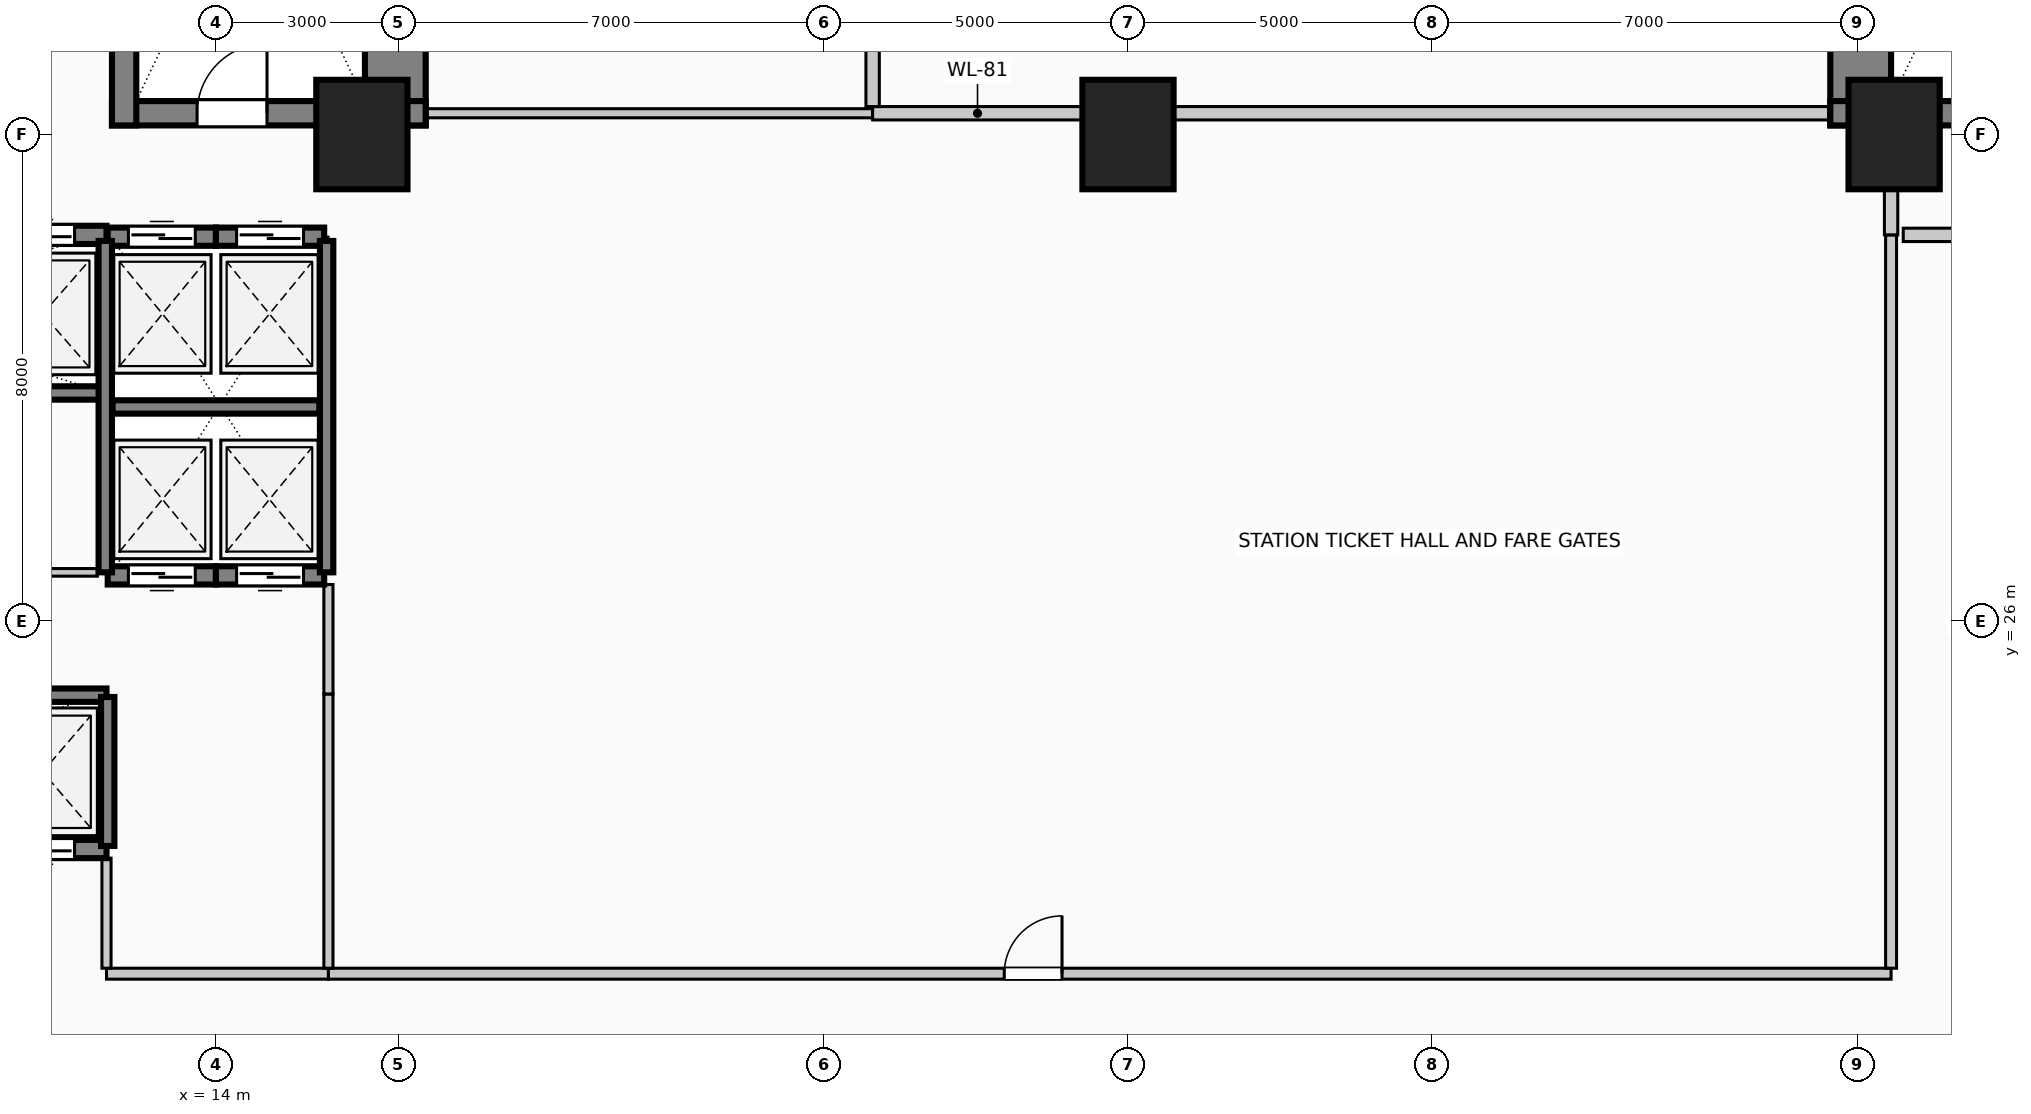
"""IFC4 building model, lengths in metres.
Left out: names, types, materials, properties, quantities, classifications, styles, units other than length and angle.
Written with IfcOpenShell. Run it as: python <this file> out.ifc"""

import sys

from ifc_helpers import new_model, si_unit, direction, frame, frame_2d, origin, origin_2d, place, context, subcontext, project, spatial, rectangle, extrude, element, fill, save


model = new_model("IFC4")
c1 = context("Model", 3, precision=1e-05, world=origin(), true_north=direction((0.0, 1.0)))
c2 = subcontext(c1, "Body", "Model", "MODEL_VIEW")
j1 = project(units=[si_unit("LENGTHUNIT", "METRE"), si_unit("PLANEANGLEUNIT", "RADIAN")], contexts=[c1])
p1 = place(None, origin())
s1 = spatial("IfcSite", under=j1, at=p1, CompositionType="ELEMENT")
p2 = place(p1, origin())
s2 = spatial("IfcBuilding", under=s1, at=p2, CompositionType="ELEMENT")
p3 = place(p2, origin())
s3 = spatial("IfcBuildingStorey", under=s2, at=p3, CompositionType="ELEMENT", Elevation=0.0)
p4 = place(p3, frame((16.95, 34.15, 0.0), z_axis=(0.0, 0.0, 1.0), x_axis=(0.0, 1.0, 0.0)))
e1 = element("IfcWall", 1, at=p4, inside=s3, PredefinedType="SHEAR", context=c2, shape_type="SweptSolid", body=[
    extrude(rectangle(XDim=9.28, YDim=1.0, at=frame_2d((4.64, 0.0))), origin(), (0.0, 0.0, 1.0), 5.4),
])
p5 = place(p3, frame((12.29, 34.35, 0.0), z_axis=(0.0, 0.0, 1.0), x_axis=(1.0, 0.0, 0.0)))
e2 = element("IfcWall", 2, at=p5, inside=s3, PredefinedType="SHEAR", context=c2, shape_type="SweptSolid", body=[
    extrude(rectangle(XDim=5.16, YDim=0.4, at=frame_2d((2.58, 0.0))), origin(), (0.0, 0.0, 1.0), 5.4),
])
p6 = place(p5, frame((1.4, 0.0, 0.0)))
e3 = element("IfcOpeningElement", 3, at=p6, cuts=e2, PredefinedType="OPENING", context=c2, shape_type="SweptSolid", body=[
    extrude(rectangle(XDim=1.15, YDim=2.2, at=frame_2d((0.575, 1.1))), frame((0.0, 0.21, 0.0), z_axis=(0.0, -1.0, 0.0), x_axis=(1.0, 0.0, 0.0)), (0.0, 0.0, 1.0), 0.42),
])
p7 = place(p3, frame((12.49, 34.15, 0.0), z_axis=(0.0, 0.0, 1.0), x_axis=(0.0, 1.0, 0.0)))
e4 = element("IfcWall", 4, at=p7, inside=s3, PredefinedType="SHEAR", context=c2, shape_type="SweptSolid", body=[
    extrude(rectangle(XDim=9.28, YDim=0.4, at=frame_2d((4.64, 0.0))), origin(), (0.0, 0.0, 1.0), 5.4),
])
p8 = place(p3, frame((41.05, 34.15, 0.0), z_axis=(0.0, 0.0, 1.0), x_axis=(0.0, 1.0, 0.0)))
e5 = element("IfcWall", 5, at=p8, inside=s3, PredefinedType="SHEAR", context=c2, shape_type="SweptSolid", body=[
    extrude(rectangle(XDim=9.28, YDim=1.0, at=frame_2d((4.64, 0.0))), origin(), (0.0, 0.0, 1.0), 5.4),
])
p9 = place(p3, frame((40.55, 34.35, 0.0), z_axis=(0.0, 0.0, 1.0), x_axis=(1.0, 0.0, 0.0)))
e6 = element("IfcWall", 6, at=p9, inside=s3, PredefinedType="SHEAR", context=c2, shape_type="SweptSolid", body=[
    extrude(rectangle(XDim=5.16, YDim=0.4, at=frame_2d((2.58, 0.0))), origin(), (0.0, 0.0, 1.0), 5.4),
])
p10 = place(p9, frame((2.4, 0.0, 0.0)))
e7 = element("IfcOpeningElement", 7, at=p10, cuts=e6, PredefinedType="OPENING", context=c2, shape_type="SweptSolid", body=[
    extrude(rectangle(XDim=1.15, YDim=2.2, at=frame_2d((0.575, 1.1))), frame((0.0, 0.21, 0.0), z_axis=(0.0, -1.0, 0.0), x_axis=(1.0, 0.0, 0.0)), (0.0, 0.0, 1.0), 0.42),
])
for number, where, z_axis, x_axis in (
    (8, (16.4, 34.0, 0.0), (0.0, 0.0, 1.0), (1.0, 0.0, 0.0)),
    (9, (29.0, 34.0, 0.0), (0.0, 0.0, 1.0), (1.0, 0.0, 0.0)),
    (10, (41.6, 34.0, 0.0), (0.0, 0.0, 1.0), (1.0, 0.0, 0.0)),
):
    element("IfcColumn", number, at=place(p3, frame(where, z_axis=z_axis, x_axis=x_axis)), inside=s3, PredefinedType="COLUMN", context=c2, shape_type="SweptSolid", body=[
        extrude(rectangle(XDim=1.5, YDim=1.8, at=origin_2d()), origin(), (0.0, 0.0, 1.0), 5.4),
    ])
p11 = place(p3, frame((12.2, 22.25, 0.0), z_axis=(0.0, 0.0, 1.0), x_axis=(-1.0, 0.0, 0.0)))
e11 = element("IfcWall", 11, at=p11, inside=s3, PredefinedType="SOLIDWALL", context=c2, shape_type="SweptSolid", body=[
    extrude(rectangle(XDim=2.15, YDim=0.3, at=frame_2d((1.075, 0.0))), origin(), (0.0, 0.0, 1.0), 5.4),
])
p12 = place(p11, frame((0.525, 0.0, 0.0)))
e12 = element("IfcOpeningElement", 12, at=p12, cuts=e11, PredefinedType="OPENING", context=c2, shape_type="SweptSolid", body=[
    extrude(rectangle(XDim=1.1, YDim=2.2, at=frame_2d((0.55, 1.1))), frame((0.0, 0.16, 0.0), z_axis=(0.0, -1.0, 0.0), x_axis=(1.0, 0.0, 0.0)), (0.0, 0.0, 1.0), 0.32),
])
p13 = place(p3, frame((14.0, 26.75, 0.0), z_axis=(0.0, 0.0, 1.0), x_axis=(-1.0, 0.0, 0.0)))
e13 = element("IfcWall", 13, at=p13, inside=s3, PredefinedType="SOLIDWALL", context=c2, shape_type="SweptSolid", body=[
    extrude(rectangle(XDim=1.78, YDim=0.3, at=frame_2d((0.89, 0.0))), origin(), (0.0, 0.0, 1.0), 5.4),
])
p14 = place(p13, frame((0.34, 0.0, 0.0)))
e14 = element("IfcOpeningElement", 14, at=p14, cuts=e13, PredefinedType="OPENING", context=c2, shape_type="SweptSolid", body=[
    extrude(rectangle(XDim=1.1, YDim=2.2, at=frame_2d((0.55, 1.1))), frame((0.0, 0.16, 0.0), z_axis=(0.0, -1.0, 0.0), x_axis=(1.0, 0.0, 0.0)), (0.0, 0.0, 1.0), 0.32),
])
p15 = place(p3, frame((15.78, 26.75, 0.0), z_axis=(0.0, 0.0, 1.0), x_axis=(-1.0, 0.0, 0.0)))
e15 = element("IfcWall", 15, at=p15, inside=s3, PredefinedType="SOLIDWALL", context=c2, shape_type="SweptSolid", body=[
    extrude(rectangle(XDim=1.78, YDim=0.3, at=frame_2d((0.89, 0.0))), origin(), (0.0, 0.0, 1.0), 5.4),
])
p16 = place(p15, frame((0.34, 0.0, 0.0)))
e16 = element("IfcOpeningElement", 16, at=p16, cuts=e15, PredefinedType="OPENING", context=c2, shape_type="SweptSolid", body=[
    extrude(rectangle(XDim=1.1, YDim=2.2, at=frame_2d((0.55, 1.1))), frame((0.0, 0.16, 0.0), z_axis=(0.0, -1.0, 0.0), x_axis=(1.0, 0.0, 0.0)), (0.0, 0.0, 1.0), 0.32),
])
p17 = place(p3, frame((12.22, 32.32, 0.0), z_axis=(0.0, 0.0, 1.0), x_axis=(1.0, 0.0, 0.0)))
e17 = element("IfcWall", 17, at=p17, inside=s3, PredefinedType="SOLIDWALL", context=c2, shape_type="SweptSolid", body=[
    extrude(rectangle(XDim=1.78, YDim=0.3, at=frame_2d((0.89, 0.0))), origin(), (0.0, 0.0, 1.0), 5.4),
])
p18 = place(p17, frame((0.34, 0.0, 0.0)))
e18 = element("IfcOpeningElement", 18, at=p18, cuts=e17, PredefinedType="OPENING", context=c2, shape_type="SweptSolid", body=[
    extrude(rectangle(XDim=1.1, YDim=2.2, at=frame_2d((0.55, 1.1))), frame((0.0, 0.16, 0.0), z_axis=(0.0, -1.0, 0.0), x_axis=(1.0, 0.0, 0.0)), (0.0, 0.0, 1.0), 0.32),
])
p19 = place(p3, frame((14.0, 32.32, 0.0), z_axis=(0.0, 0.0, 1.0), x_axis=(1.0, 0.0, 0.0)))
e19 = element("IfcWall", 19, at=p19, inside=s3, PredefinedType="SOLIDWALL", context=c2, shape_type="SweptSolid", body=[
    extrude(rectangle(XDim=1.78, YDim=0.3, at=frame_2d((0.89, 0.0))), origin(), (0.0, 0.0, 1.0), 5.4),
])
p20 = place(p19, frame((0.34, 0.0, 0.0)))
e20 = element("IfcOpeningElement", 20, at=p20, cuts=e19, PredefinedType="OPENING", context=c2, shape_type="SweptSolid", body=[
    extrude(rectangle(XDim=1.1, YDim=2.2, at=frame_2d((0.55, 1.1))), frame((0.0, 0.16, 0.0), z_axis=(0.0, -1.0, 0.0), x_axis=(1.0, 0.0, 0.0)), (0.0, 0.0, 1.0), 0.32),
])
p21 = place(p3, frame((10.05, 32.35, 0.0), z_axis=(0.0, 0.0, 1.0), x_axis=(1.0, 0.0, 0.0)))
e21 = element("IfcWall", 21, at=p21, inside=s3, PredefinedType="SOLIDWALL", context=c2, shape_type="SweptSolid", body=[
    extrude(rectangle(XDim=2.15, YDim=0.3, at=frame_2d((1.075, 0.0))), origin(), (0.0, 0.0, 1.0), 5.4),
])
p22 = place(p21, frame((0.525, 0.0, 0.0)))
e22 = element("IfcOpeningElement", 22, at=p22, cuts=e21, PredefinedType="OPENING", context=c2, shape_type="SweptSolid", body=[
    extrude(rectangle(XDim=1.1, YDim=2.2, at=frame_2d((0.55, 1.1))), frame((0.0, 0.16, 0.0), z_axis=(0.0, -1.0, 0.0), x_axis=(1.0, 0.0, 0.0)), (0.0, 0.0, 1.0), 0.32),
])
p23 = place(p3, frame((3.55, 29.75, 0.0), z_axis=(0.0, 0.0, 1.0), x_axis=(1.0, 0.0, 0.0)))
e23 = element("IfcWall", 23, at=p23, inside=s3, PredefinedType="SOLIDWALL", context=c2, shape_type="SweptSolid", body=[
    extrude(rectangle(XDim=8.65, YDim=0.22, at=frame_2d((4.325, 0.0))), origin(), (0.0, 0.0, 1.0), 5.4),
])
for number, where, z_axis, x_axis in (
    (24, (12.18, 26.8, 0.0), (0.0, 0.0, 1.0), (0.0, 1.0, 0.0)),
    (25, (15.82, 26.8, 0.0), (0.0, 0.0, 1.0), (0.0, 1.0, 0.0)),
):
    element("IfcWall", number, at=place(p3, frame(where, z_axis=z_axis, x_axis=x_axis)), inside=s3, PredefinedType="SOLIDWALL", context=c2, shape_type="SweptSolid", body=[
        extrude(rectangle(XDim=5.45, YDim=0.22, at=frame_2d((2.725, 0.0))), origin(), (0.0, 0.0, 1.0), 5.4),
    ])
p24 = place(p3, frame((12.3, 29.52, 0.0), z_axis=(0.0, 0.0, 1.0), x_axis=(1.0, 0.0, 0.0)))
e26 = element("IfcWall", 26, at=p24, inside=s3, PredefinedType="SOLIDWALL", context=c2, shape_type="SweptSolid", body=[
    extrude(rectangle(XDim=3.4, YDim=0.22, at=frame_2d((1.7, 0.0))), origin(), (0.0, 0.0, 1.0), 5.4),
])
p25 = place(p3, frame((3.55, 24.78, 0.0), z_axis=(0.0, 0.0, 1.0), x_axis=(1.0, 0.0, 0.0)))
e27 = element("IfcWall", 27, at=p25, inside=s3, PredefinedType="SOLIDWALL", context=c2, shape_type="SweptSolid", body=[
    extrude(rectangle(XDim=8.65, YDim=0.22, at=frame_2d((4.325, 0.0))), origin(), (0.0, 0.0, 1.0), 5.4),
])
p26 = place(p3, frame((12.22, 22.3, 0.0), z_axis=(0.0, 0.0, 1.0), x_axis=(0.0, 1.0, 0.0)))
e28 = element("IfcWall", 28, at=p26, inside=s3, PredefinedType="SOLIDWALL", context=c2, shape_type="SweptSolid", body=[
    extrude(rectangle(XDim=2.45, YDim=0.22, at=frame_2d((1.225, 0.0))), origin(), (0.0, 0.0, 1.0), 5.4),
])
p27 = place(p3, frame((41.75, 32.35, 0.0), z_axis=(0.0, 0.0, 1.0), x_axis=(1.0, 0.0, 0.0)))
e29 = element("IfcWall", 29, at=p27, inside=s3, PredefinedType="PARTITIONING", context=c2, shape_type="SweptSolid", body=[
    extrude(rectangle(XDim=3.8, YDim=0.22, at=frame_2d((1.9, 0.0))), origin(), (0.0, 0.0, 1.0), 5.0),
])
p28 = place(p27, frame((1.35, 0.0, 0.0)))
e30 = element("IfcOpeningElement", 30, at=p28, cuts=e29, PredefinedType="OPENING", context=c2, shape_type="SweptSolid", body=[
    extrude(rectangle(XDim=1.1, YDim=2.2, at=frame_2d((0.55, 1.1))), frame((0.0, 0.12, 0.0), z_axis=(0.0, -1.0, 0.0), x_axis=(1.0, 0.0, 0.0)), (0.0, 0.0, 1.0), 0.24),
])
p29 = place(p3, frame((12.2, 20.2, 0.0), z_axis=(0.0, 0.0, 1.0), x_axis=(1.0, 0.0, 0.0)))
e31 = element("IfcWall", 31, at=p29, inside=s3, PredefinedType="PARTITIONING", context=c2, shape_type="SweptSolid", body=[
    extrude(rectangle(XDim=3.65, YDim=0.18, at=frame_2d((1.825, 0.0))), origin(), (0.0, 0.0, 1.0), 5.0),
])
p30 = place(p3, frame((15.85, 20.2, 0.0), z_axis=(0.0, 0.0, 1.0), x_axis=(1.0, 0.0, 0.0)))
e32 = element("IfcWall", 32, at=p30, inside=s3, PredefinedType="PARTITIONING", context=c2, shape_type="SweptSolid", body=[
    extrude(rectangle(XDim=25.7, YDim=0.18, at=frame_2d((12.85, 0.0))), origin(), (0.0, 0.0, 1.0), 5.0),
])
p31 = place(p30, frame((11.115, 0.0, 0.0)))
e33 = element("IfcOpeningElement", 33, at=p31, cuts=e32, PredefinedType="OPENING", context=c2, shape_type="SweptSolid", body=[
    extrude(rectangle(XDim=0.95, YDim=2.15, at=frame_2d((0.475, 1.075))), frame((0.0, 0.1, 0.0), z_axis=(0.0, -1.0, 0.0), x_axis=(1.0, 0.0, 0.0)), (0.0, 0.0, 1.0), 0.2),
])
p32 = place(p3, frame((7.89, 26.8, 0.0), z_axis=(0.0, 0.0, 1.0), x_axis=(1.0, 0.0, 0.0)))
e34 = element("IfcWall", 34, at=p32, inside=s3, PredefinedType="PARTITIONING", context=c2, shape_type="SweptSolid", body=[
    extrude(rectangle(XDim=4.16, YDim=0.125, at=frame_2d((2.08, 0.0))), origin(), (0.0, 0.0, 1.0), 5.0),
])
p33 = place(p32, frame((1.62, 0.0, 0.0)))
e35 = element("IfcOpeningElement", 35, at=p33, cuts=e34, PredefinedType="OPENING", context=c2, shape_type="SweptSolid", body=[
    extrude(rectangle(XDim=0.92, YDim=2.1, at=frame_2d((0.46, 1.05))), frame((0.0, 0.073, 0.0), z_axis=(0.0, -1.0, 0.0), x_axis=(1.0, 0.0, 0.0)), (0.0, 0.0, 1.0), 0.145),
])
p34 = place(p3, frame((17.45, 34.35, 0.0), z_axis=(0.0, 0.0, 1.0), x_axis=(1.0, 0.0, 0.0)))
e36 = element("IfcWall", 36, at=p34, inside=s3, PredefinedType="PARTITIONING", context=c2, shape_type="SweptSolid", body=[
    extrude(rectangle(XDim=7.35, YDim=0.15, at=frame_2d((3.675, 0.0))), origin(), (0.0, 0.0, 1.0), 4.045),
])
p35 = place(p3, frame((24.8, 34.35, 0.0), z_axis=(0.0, 0.0, 1.0), x_axis=(1.0, 0.0, 0.0)))
e37 = element("IfcWall", 37, at=p35, inside=s3, PredefinedType="PARTITIONING", context=c2, shape_type="SweptSolid", body=[
    extrude(rectangle(XDim=3.45, YDim=0.22, at=frame_2d((1.725, 0.0))), origin(), (0.0, 0.0, 1.0), 4.045),
])
p36 = place(p3, frame((29.75, 34.35, 0.0), z_axis=(0.0, 0.0, 1.0), x_axis=(1.0, 0.0, 0.0)))
e38 = element("IfcWall", 38, at=p36, inside=s3, PredefinedType="PARTITIONING", context=c2, shape_type="SweptSolid", body=[
    extrude(rectangle(XDim=10.8, YDim=0.22, at=frame_2d((5.4, 0.0))), origin(), (0.0, 0.0, 1.0), 4.045),
])
p37 = place(p3, frame((12.2, 20.29, 0.0), z_axis=(0.0, 0.0, 1.0), x_axis=(0.0, 1.0, 0.0)))
e39 = element("IfcWall", 39, at=p37, inside=s3, PredefinedType="PARTITIONING", context=c2, shape_type="SweptSolid", body=[
    extrude(rectangle(XDim=1.81, YDim=0.15, at=frame_2d((0.905, 0.0))), origin(), (0.0, 0.0, 1.0), 5.0),
])
p38 = place(p3, frame((15.85, 20.29, 0.0), z_axis=(0.0, 0.0, 1.0), x_axis=(0.0, 1.0, 0.0)))
e40 = element("IfcWall", 40, at=p38, inside=s3, PredefinedType="PARTITIONING", context=c2, shape_type="SweptSolid", body=[
    extrude(rectangle(XDim=4.51, YDim=0.15, at=frame_2d((2.255, 0.0))), origin(), (0.0, 0.0, 1.0), 5.0),
])
p39 = place(p3, frame((15.85, 24.8, 0.0), z_axis=(0.0, 0.0, 1.0), x_axis=(0.0, 1.0, 0.0)))
e41 = element("IfcWall", 41, at=p39, inside=s3, PredefinedType="PARTITIONING", context=c2, shape_type="SweptSolid", body=[
    extrude(rectangle(XDim=1.8, YDim=0.15, at=frame_2d((0.9, 0.0))), origin(), (0.0, 0.0, 1.0), 5.0),
])
p40 = place(p3, frame((24.8, 34.46, 0.0), z_axis=(0.0, 0.0, 1.0), x_axis=(0.0, 1.0, 0.0)))
e42 = element("IfcWall", 42, at=p40, inside=s3, PredefinedType="PARTITIONING", context=c2, shape_type="SweptSolid", body=[
    extrude(rectangle(XDim=7.865, YDim=0.22, at=frame_2d((3.933, 0.0))), origin(), (0.0, 0.0, 1.0), 5.0),
])
p41 = place(p40, frame((3.407, 0.0, 0.0)))
e43 = element("IfcOpeningElement", 43, at=p41, cuts=e42, PredefinedType="OPENING", context=c2, shape_type="SweptSolid", body=[
    extrude(rectangle(XDim=1.05, YDim=2.15, at=frame_2d((0.525, 1.075))), frame((0.0, 0.12, 0.0), z_axis=(0.0, -1.0, 0.0), x_axis=(1.0, 0.0, 0.0)), (0.0, 0.0, 1.0), 0.24),
])
p42 = place(p3, frame((41.55, 20.29, 0.0), z_axis=(0.0, 0.0, 1.0), x_axis=(0.0, 1.0, 0.0)))
e44 = element("IfcWall", 44, at=p42, inside=s3, PredefinedType="PARTITIONING", context=c2, shape_type="SweptSolid", body=[
    extrude(rectangle(XDim=12.06, YDim=0.18, at=frame_2d((6.03, 0.0))), origin(), (0.0, 0.0, 1.0), 4.045),
])
p43 = place(p3, frame((41.55, 32.35, 0.0), z_axis=(0.0, 0.0, 1.0), x_axis=(0.0, 1.0, 0.0)))
e45 = element("IfcWall", 45, at=p43, inside=s3, PredefinedType="PARTITIONING", context=c2, shape_type="SweptSolid", body=[
    extrude(rectangle(XDim=0.75, YDim=0.22, at=frame_2d((0.375, 0.0))), origin(), (0.0, 0.0, 1.0), 4.045),
])
p44 = place(p12, origin())
e46 = element("IfcDoor", 46, at=p44, inside=s3, OperationType="SLIDING_TO_RIGHT", PredefinedType="DOOR", context=c2, shape_type="SweptSolid", body=[
    extrude(rectangle(XDim=1.1, YDim=2.2, at=frame_2d((0.55, 1.1))), frame((0.0, 0.025, 0.0), z_axis=(0.0, -1.0, 0.0), x_axis=(1.0, 0.0, 0.0)), (0.0, 0.0, 1.0), 0.05),
])
fill(e12, e46)
p45 = place(p14, origin())
e47 = element("IfcDoor", 47, at=p45, inside=s3, OperationType="SLIDING_TO_LEFT", PredefinedType="DOOR", context=c2, shape_type="SweptSolid", body=[
    extrude(rectangle(XDim=1.1, YDim=2.2, at=frame_2d((0.55, 1.1))), frame((0.0, 0.025, 0.0), z_axis=(0.0, -1.0, 0.0), x_axis=(1.0, 0.0, 0.0)), (0.0, 0.0, 1.0), 0.05),
])
fill(e14, e47)
p46 = place(p16, origin())
e48 = element("IfcDoor", 48, at=p46, inside=s3, OperationType="SLIDING_TO_RIGHT", PredefinedType="DOOR", context=c2, shape_type="SweptSolid", body=[
    extrude(rectangle(XDim=1.1, YDim=2.2, at=frame_2d((0.55, 1.1))), frame((0.0, 0.025, 0.0), z_axis=(0.0, -1.0, 0.0), x_axis=(1.0, 0.0, 0.0)), (0.0, 0.0, 1.0), 0.05),
])
fill(e16, e48)
p47 = place(p18, origin())
e49 = element("IfcDoor", 49, at=p47, inside=s3, OperationType="SLIDING_TO_LEFT", PredefinedType="DOOR", context=c2, shape_type="SweptSolid", body=[
    extrude(rectangle(XDim=1.1, YDim=2.2, at=frame_2d((0.55, 1.1))), frame((0.0, 0.025, 0.0), z_axis=(0.0, -1.0, 0.0), x_axis=(1.0, 0.0, 0.0)), (0.0, 0.0, 1.0), 0.05),
])
fill(e18, e49)
p48 = place(p20, origin())
e50 = element("IfcDoor", 50, at=p48, inside=s3, OperationType="SLIDING_TO_RIGHT", PredefinedType="DOOR", context=c2, shape_type="SweptSolid", body=[
    extrude(rectangle(XDim=1.1, YDim=2.2, at=frame_2d((0.55, 1.1))), frame((0.0, 0.025, 0.0), z_axis=(0.0, -1.0, 0.0), x_axis=(1.0, 0.0, 0.0)), (0.0, 0.0, 1.0), 0.05),
])
fill(e20, e50)
p49 = place(p22, origin())
e51 = element("IfcDoor", 51, at=p49, inside=s3, OperationType="SLIDING_TO_RIGHT", PredefinedType="DOOR", context=c2, shape_type="SweptSolid", body=[
    extrude(rectangle(XDim=1.1, YDim=2.2, at=frame_2d((0.55, 1.1))), frame((0.0, 0.025, 0.0), z_axis=(0.0, -1.0, 0.0), x_axis=(1.0, 0.0, 0.0)), (0.0, 0.0, 1.0), 0.05),
])
fill(e22, e51)
p50 = place(p6, origin())
e52 = element("IfcDoor", 52, at=p50, inside=s3, OperationType="SINGLE_SWING_RIGHT", PredefinedType="DOOR", context=c2, shape_type="SweptSolid", body=[
    extrude(rectangle(XDim=1.15, YDim=2.2, at=frame_2d((0.575, 1.1))), frame((0.0, 0.025, 0.0), z_axis=(0.0, -1.0, 0.0), x_axis=(1.0, 0.0, 0.0)), (0.0, 0.0, 1.0), 0.05),
])
fill(e3, e52)
p51 = place(p31, origin())
e53 = element("IfcDoor", 53, at=p51, inside=s3, OperationType="SINGLE_SWING_RIGHT", PredefinedType="DOOR", context=c2, shape_type="SweptSolid", body=[
    extrude(rectangle(XDim=0.95, YDim=2.15, at=frame_2d((0.475, 1.075))), frame((0.0, 0.025, 0.0), z_axis=(0.0, -1.0, 0.0), x_axis=(1.0, 0.0, 0.0)), (0.0, 0.0, 1.0), 0.05),
])
fill(e33, e53)
save(model, sys.argv[1])
